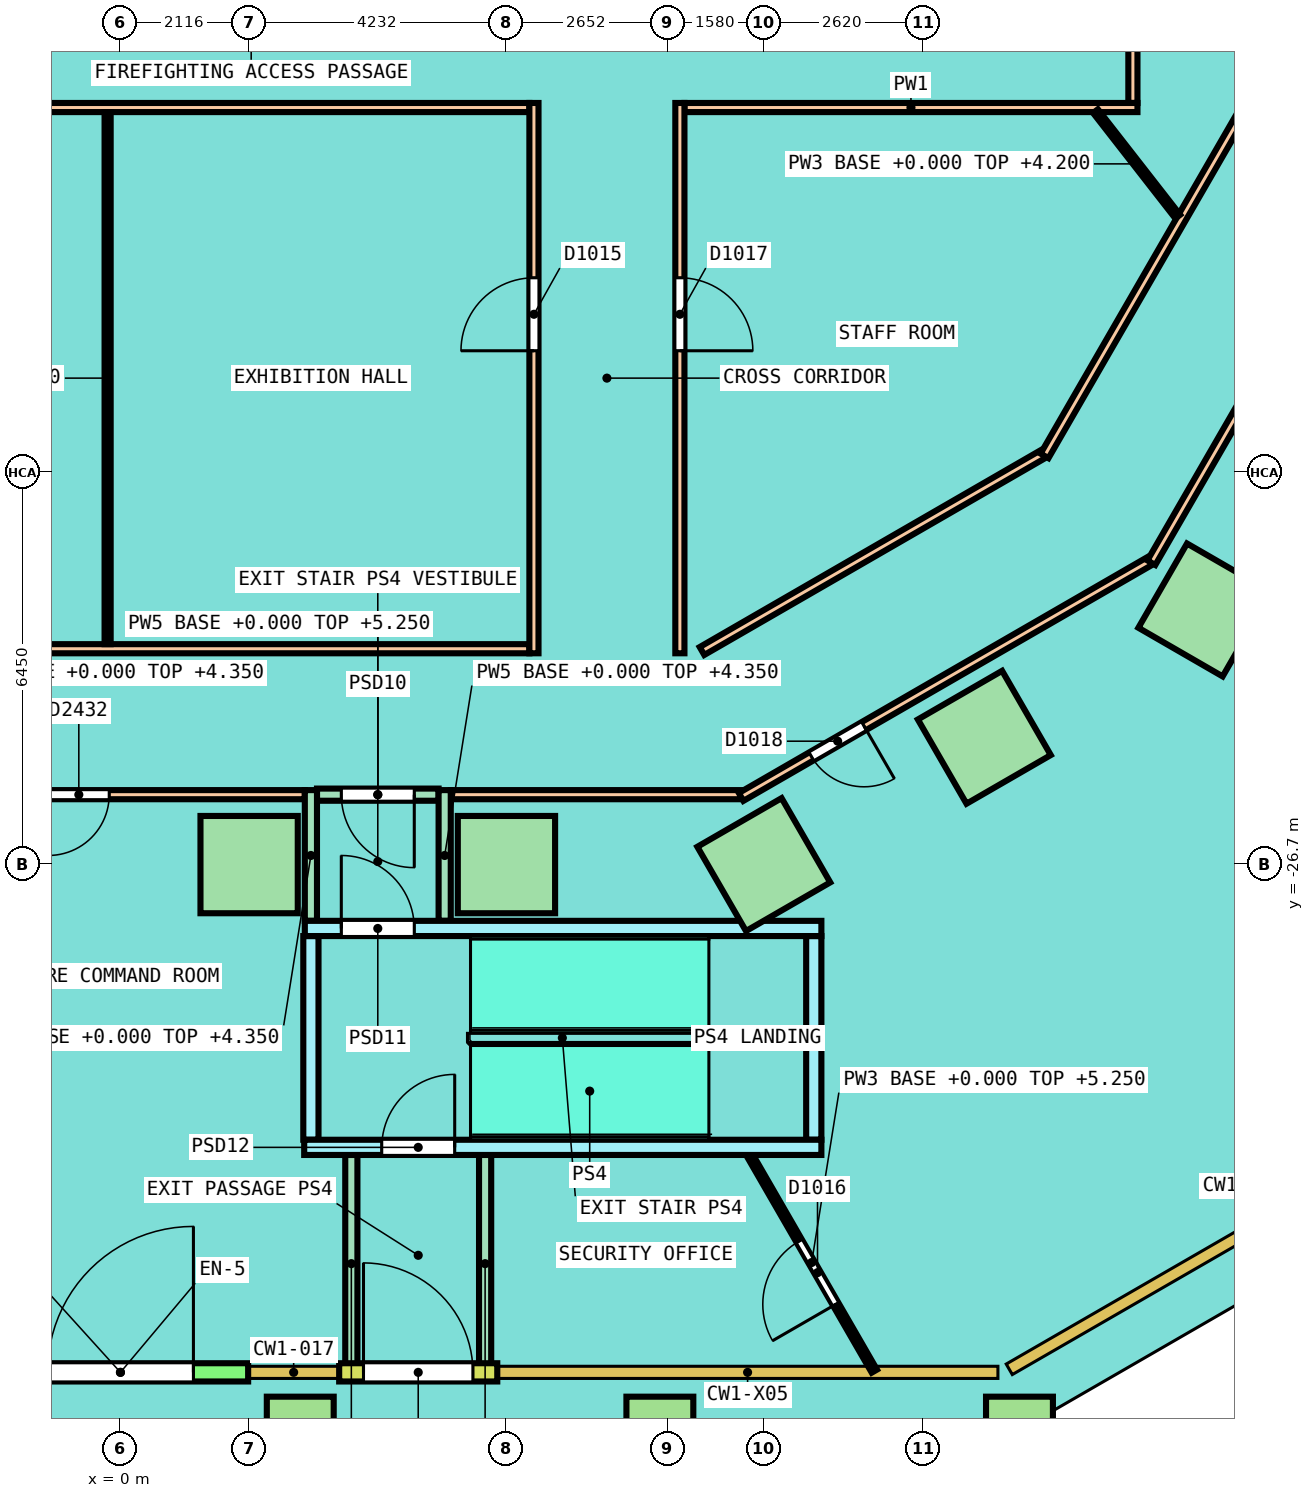
"""IFC4 building model, lengths in metres.
Left out: names, types, materials, properties, quantities, classifications, styles, units other than length and angle.
Written with IfcOpenShell. Run it as: python <this file> out.ifc"""

import sys

from ifc_helpers import new_model, si_unit, direction, frame, frame_2d, origin, origin_2d, place, context, subcontext, project, spatial, rectangle, extrude, element, fill, save


model = new_model("IFC4")
c1 = context("Model", 3, precision=1e-05, world=origin(), true_north=direction((0.0, 1.0)))
c2 = subcontext(c1, "Body", "Model", "MODEL_VIEW")
j1 = project(units=[si_unit("LENGTHUNIT", "METRE"), si_unit("PLANEANGLEUNIT", "RADIAN")], contexts=[c1])
p1 = place(None, origin())
s1 = spatial("IfcSite", under=j1, at=p1, CompositionType="ELEMENT")
p2 = place(p1, origin())
s2 = spatial("IfcBuilding", under=s1, at=p2, CompositionType="ELEMENT")
p3 = place(p2, origin())
s3 = spatial("IfcBuildingStorey", under=s2, at=p3, CompositionType="ELEMENT", Elevation=0.0)
for number, where, z_axis, x_axis in (
    (1, (2.116, -26.7, 0.0), (0.0, 0.0, 1.0), (1.0, 0.0, 0.0)),
    (2, (6.348, -26.7, 0.0), (0.0, 0.0, 1.0), (1.0, 0.0, 0.0)),
    (3, (10.58, -26.7, 0.0), (0.0, 0.0, 1.0), (0.866, 0.5, 0.0)),
    (4, (14.206, -24.606, 0.0), (0.0, 0.0, 1.0), (0.866, 0.5, 0.0)),
    (5, (17.833, -22.512, 0.0), (0.0, 0.0, 1.0), (0.5, 0.866, 0.0)),
):
    element("IfcColumn", number, at=place(p3, frame(where, z_axis=z_axis, x_axis=x_axis)), inside=s3, PredefinedType="COLUMN", context=c2, shape_type="SweptSolid", body=[
        extrude(rectangle(XDim=1.6, YDim=1.6, at=origin_2d()), origin(), (0.0, 0.0, 1.0), 5.25),
    ])
for number, where, z_axis, x_axis in (
    (6, (2.957, -36.0, -0.35), (0.0, 0.0, 1.0), (1.0, 0.0, 0.0)),
    (7, (8.871, -36.0, -0.35), (0.0, 0.0, 1.0), (1.0, 0.0, 0.0)),
    (8, (14.785, -36.0, -0.35), (0.0, 0.0, 1.0), (1.0, 0.0, 0.0)),
):
    element("IfcColumn", number, at=place(p3, frame(where, z_axis=z_axis, x_axis=x_axis)), inside=s3, PredefinedType="COLUMN", context=c2, shape_type="SweptSolid", body=[
        extrude(rectangle(XDim=1.1, YDim=1.1, at=origin_2d()), origin(), (0.0, 0.0, 1.0), 5.6),
    ])
p4 = place(p3, frame((-2.1, -35.05, 0.0), z_axis=(0.0, 0.0, 1.0), x_axis=(1.0, 0.0, 0.0)))
e9 = element("IfcWall", 9, at=p4, inside=s3, PredefinedType="SOLIDWALL", context=c2, shape_type="SweptSolid", body=[
    extrude(rectangle(XDim=4.2, YDim=0.3, at=frame_2d((2.1, 0.0))), origin(), (0.0, 0.0, 1.0), 5.25),
])
p5 = place(p4, frame((0.9, 0.0, 0.0)))
e10 = element("IfcOpeningElement", 10, at=p5, cuts=e9, PredefinedType="OPENING", context=c2, shape_type="SweptSolid", body=[
    extrude(rectangle(XDim=2.4, YDim=3.0, at=frame_2d((1.2, 1.5))), frame((0.0, 0.16, 0.0), z_axis=(0.0, -1.0, 0.0), x_axis=(1.0, 0.0, 0.0)), (0.0, 0.0, 1.0), 0.32),
])
p6 = place(p3, frame((3.597, -35.05, 0.0), z_axis=(0.0, 0.0, 1.0), x_axis=(1.0, 0.0, 0.0)))
e11 = element("IfcWall", 11, at=p6, inside=s3, PredefinedType="SOLIDWALL", context=c2, shape_type="SweptSolid", body=[
    extrude(rectangle(XDim=2.6, YDim=0.3, at=frame_2d((1.3, 0.0))), origin(), (0.0, 0.0, 1.0), 5.25),
])
p7 = place(p6, frame((2.2, 0.0, 0.0), z_axis=(0.0, 0.0, 1.0), x_axis=(-1.0, 0.0, 0.0)))
e12 = element("IfcOpeningElement", 12, at=p7, cuts=e11, PredefinedType="OPENING", context=c2, shape_type="SweptSolid", body=[
    extrude(rectangle(XDim=1.8, YDim=2.4, at=frame_2d((0.9, 1.2))), frame((0.0, 0.16, 0.0), z_axis=(0.0, -1.0, 0.0), x_axis=(1.0, 0.0, 0.0)), (0.0, 0.0, 1.0), 0.32),
])
p8 = place(p3, frame((16.65, -14.175, 0.0), z_axis=(0.0, 0.0, 1.0), x_axis=(0.0, 1.0, 0.0)))
e13 = element("IfcWall", 13, at=p8, inside=s3, PredefinedType="PARTITIONING", context=c2, shape_type="SweptSolid", body=[
    extrude(rectangle(XDim=19.275, YDim=0.15, at=frame_2d((9.638, 0.0))), origin(), (0.0, 0.0, 1.0), 4.2),
])
p9 = place(p3, frame((-9.704, -23.15, 0.0), z_axis=(0.0, 0.0, 1.0), x_axis=(1.0, 0.0, 0.0)))
e14 = element("IfcWall", 14, at=p9, inside=s3, PredefinedType="PARTITIONING", context=c2, shape_type="SweptSolid", body=[
    extrude(rectangle(XDim=16.429, YDim=0.15, at=frame_2d((8.214, 0.0))), origin(), (0.0, 0.0, 1.0), 4.2),
])
p10 = place(p3, frame((-3.032, -25.55, 0.0), z_axis=(0.0, 0.0, 1.0), x_axis=(1.0, 0.0, 0.0)))
e15 = element("IfcWall", 15, at=p10, inside=s3, PredefinedType="PARTITIONING", context=c2, shape_type="SweptSolid", body=[
    extrude(rectangle(XDim=6.064, YDim=0.15, at=frame_2d((3.032, 0.0))), origin(), (0.0, 0.0, 1.0), 4.2),
])
p11 = place(p10, frame((1.847, 0.0, 0.0)))
e16 = element("IfcOpeningElement", 16, at=p11, cuts=e15, PredefinedType="OPENING", context=c2, shape_type="SweptSolid", body=[
    extrude(rectangle(XDim=1.0, YDim=2.1, at=frame_2d((0.5, 1.05))), frame((0.0, 0.085, 0.0), z_axis=(0.0, -1.0, 0.0), x_axis=(1.0, 0.0, 0.0)), (0.0, 0.0, 1.0), 0.17),
])
p12 = place(p3, frame((5.432, -25.55, 0.0), z_axis=(0.0, 0.0, 1.0), x_axis=(1.0, 0.0, 0.0)))
e17 = element("IfcWall", 17, at=p12, inside=s3, PredefinedType="PARTITIONING", context=c2, shape_type="SweptSolid", body=[
    extrude(rectangle(XDim=4.765, YDim=0.15, at=frame_2d((2.382, 0.0))), origin(), (0.0, 0.0, 1.0), 4.2),
])
p13 = place(p3, frame((9.564, -23.188, 0.0), z_axis=(0.0, 0.0, 1.0), x_axis=(0.866024786089, 0.500001069878, 0.0)))
e18 = element("IfcWall", 18, at=p13, inside=s3, PredefinedType="PARTITIONING", context=c2, shape_type="SweptSolid", body=[
    extrude(rectangle(XDim=6.473, YDim=0.15, at=frame_2d((3.236, 0.0))), origin(), (0.0, 0.0, 1.0), 4.2),
])
p14 = place(p3, frame((15.197, -19.979, 0.0), z_axis=(0.0, 0.0, 1.0), x_axis=(0.499992422807, 0.866029778435, 0.0)))
e19 = element("IfcWall", 19, at=p14, inside=s3, PredefinedType="PARTITIONING", context=c2, shape_type="SweptSolid", body=[
    extrude(rectangle(XDim=19.257, YDim=0.15, at=frame_2d((9.628, 0.0))), origin(), (0.0, 0.0, 1.0), 4.2),
])
p15 = place(p14, frame((9.43, 0.0, 0.0)))
e20 = element("IfcOpeningElement", 20, at=p15, cuts=e19, PredefinedType="OPENING", context=c2, shape_type="SweptSolid", body=[
    extrude(rectangle(XDim=1.0, YDim=2.1, at=frame_2d((0.5, 1.05))), frame((0.0, 0.085, 0.0), z_axis=(0.0, -1.0, 0.0), x_axis=(1.0, 0.0, 0.0)), (0.0, 0.0, 1.0), 0.17),
])
p16 = place(p3, frame((10.207, -25.587, 0.0), z_axis=(0.0, 0.0, 1.0), x_axis=(0.866023143435, 0.50000391502, 0.0)))
e21 = element("IfcWall", 21, at=p16, inside=s3, PredefinedType="PARTITIONING", context=c2, shape_type="SweptSolid", body=[
    extrude(rectangle(XDim=7.759, YDim=0.15, at=frame_2d((3.879, 0.0))), origin(), (0.0, 0.0, 1.0), 4.2),
])
p17 = place(p16, frame((1.334, 0.0, 0.0)))
e22 = element("IfcOpeningElement", 22, at=p17, cuts=e21, PredefinedType="OPENING", context=c2, shape_type="SweptSolid", body=[
    extrude(rectangle(XDim=1.0, YDim=2.1, at=frame_2d((0.5, 1.05))), frame((0.0, 0.085, 0.0), z_axis=(0.0, -1.0, 0.0), x_axis=(1.0, 0.0, 0.0)), (0.0, 0.0, 1.0), 0.17),
])
p18 = place(p3, frame((16.954, -21.736, 0.0), z_axis=(0.0, 0.0, 1.0), x_axis=(0.499996491498, 0.86602742941, 0.0)))
e23 = element("IfcWall", 23, at=p18, inside=s3, PredefinedType="PARTITIONING", context=c2, shape_type="SweptSolid", body=[
    extrude(rectangle(XDim=20.694, YDim=0.15, at=frame_2d((10.347, 0.0))), origin(), (0.0, 0.0, 1.0), 4.2),
])
p19 = place(p18, frame((13.254, 0.0, 0.0)))
e24 = element("IfcOpeningElement", 24, at=p19, cuts=e23, PredefinedType="OPENING", context=c2, shape_type="SweptSolid", body=[
    extrude(rectangle(XDim=1.0, YDim=2.1, at=frame_2d((0.5, 1.05))), frame((0.0, 0.085, 0.0), z_axis=(0.0, -1.0, 0.0), x_axis=(1.0, 0.0, 0.0)), (0.0, 0.0, 1.0), 0.17),
])
p20 = place(p3, frame((-16.725, -14.25, 0.0), z_axis=(0.0, 0.0, 1.0), x_axis=(1.0, 0.0, 0.0)))
e25 = element("IfcWall", 25, at=p20, inside=s3, PredefinedType="PARTITIONING", context=c2, shape_type="SweptSolid", body=[
    extrude(rectangle(XDim=23.45, YDim=0.15, at=frame_2d((11.725, 0.0))), origin(), (0.0, 0.0, 1.0), 4.2),
])
p21 = place(p3, frame((9.275, -14.25, 0.0), z_axis=(0.0, 0.0, 1.0), x_axis=(1.0, 0.0, 0.0)))
e26 = element("IfcWall", 26, at=p21, inside=s3, PredefinedType="PARTITIONING", context=c2, shape_type="SweptSolid", body=[
    extrude(rectangle(XDim=7.45, YDim=0.15, at=frame_2d((3.725, 0.0))), origin(), (0.0, 0.0, 1.0), 4.2),
])
p22 = place(p3, frame((6.8, -23.225, 0.0), z_axis=(0.0, 0.0, 1.0), x_axis=(0.0, 1.0, 0.0)))
e27 = element("IfcWall", 27, at=p22, inside=s3, PredefinedType="PARTITIONING", context=c2, shape_type="SweptSolid", body=[
    extrude(rectangle(XDim=9.05, YDim=0.15, at=frame_2d((4.525, 0.0))), origin(), (0.0, 0.0, 1.0), 4.2),
])
p23 = place(p22, frame((4.975, 0.0, 0.0)))
e28 = element("IfcOpeningElement", 28, at=p23, cuts=e27, PredefinedType="OPENING", context=c2, shape_type="SweptSolid", body=[
    extrude(rectangle(XDim=1.2, YDim=2.1, at=frame_2d((0.6, 1.05))), frame((0.0, 0.085, 0.0), z_axis=(0.0, -1.0, 0.0), x_axis=(1.0, 0.0, 0.0)), (0.0, 0.0, 1.0), 0.17),
])
p24 = place(p3, frame((9.2, -23.225, 0.0), z_axis=(0.0, 0.0, 1.0), x_axis=(0.0, 1.0, 0.0)))
e29 = element("IfcWall", 29, at=p24, inside=s3, PredefinedType="PARTITIONING", context=c2, shape_type="SweptSolid", body=[
    extrude(rectangle(XDim=9.05, YDim=0.15, at=frame_2d((4.525, 0.0))), origin(), (0.0, 0.0, 1.0), 4.2),
])
p25 = place(p24, frame((4.975, 0.0, 0.0)))
e30 = element("IfcOpeningElement", 30, at=p25, cuts=e29, PredefinedType="OPENING", context=c2, shape_type="SweptSolid", body=[
    extrude(rectangle(XDim=1.2, YDim=2.1, at=frame_2d((0.6, 1.05))), frame((0.0, 0.085, 0.0), z_axis=(0.0, -1.0, 0.0), x_axis=(1.0, 0.0, 0.0)), (0.0, 0.0, 1.0), 0.17),
])
p26 = place(p3, frame((3.232, -25.55, 0.0), z_axis=(0.0, 0.0, 1.0), x_axis=(1.0, 0.0, 0.0)))
e31 = element("IfcWall", 31, at=p26, inside=s3, PredefinedType="PARTITIONING", context=c2, shape_type="SweptSolid", body=[
    extrude(rectangle(XDim=2.0, YDim=0.2, at=frame_2d((1.0, 0.0))), origin(), (0.0, 0.0, 1.0), 5.25),
])
p27 = place(p26, frame((1.6, 0.0, 0.0), z_axis=(0.0, 0.0, 1.0), x_axis=(-1.0, 0.0, 0.0)))
e32 = element("IfcOpeningElement", 32, at=p27, cuts=e31, PredefinedType="OPENING", context=c2, shape_type="SweptSolid", body=[
    extrude(rectangle(XDim=1.2, YDim=2.1, at=frame_2d((0.6, 1.05))), frame((0.0, 0.11, 0.0), z_axis=(0.0, -1.0, 0.0), x_axis=(1.0, 0.0, 0.0)), (0.0, 0.0, 1.0), 0.22),
])
p28 = place(p3, frame((5.332, -27.625, 0.0), z_axis=(0.0, 0.0, 1.0), x_axis=(0.0, 1.0, 0.0)))
e33 = element("IfcWall", 33, at=p28, inside=s3, PredefinedType="PARTITIONING", context=c2, shape_type="SweptSolid", body=[
    extrude(rectangle(XDim=2.15, YDim=0.2, at=frame_2d((1.075, 0.0))), origin(), (0.0, 0.0, 1.0), 4.35),
])
p29 = place(p3, frame((5.997, -35.05, 0.0), z_axis=(0.0, 0.0, 1.0), x_axis=(0.0, 1.0, 0.0)))
e34 = element("IfcWall", 34, at=p29, inside=s3, PredefinedType="PARTITIONING", context=c2, shape_type="SweptSolid", body=[
    extrude(rectangle(XDim=3.575, YDim=0.2, at=frame_2d((1.788, 0.0))), origin(), (0.0, 0.0, 1.0), 5.25),
])
p30 = place(p3, frame((3.132, -27.625, 0.0), z_axis=(0.0, 0.0, 1.0), x_axis=(0.0, 1.0, 0.0)))
e35 = element("IfcWall", 35, at=p30, inside=s3, PredefinedType="PARTITIONING", context=c2, shape_type="SweptSolid", body=[
    extrude(rectangle(XDim=2.15, YDim=0.2, at=frame_2d((1.075, 0.0))), origin(), (0.0, 0.0, 1.0), 4.35),
])
p31 = place(p3, frame((3.797, -35.05, 0.0), z_axis=(0.0, 0.0, 1.0), x_axis=(0.0, 1.0, 0.0)))
e36 = element("IfcWall", 36, at=p31, inside=s3, PredefinedType="PARTITIONING", context=c2, shape_type="SweptSolid", body=[
    extrude(rectangle(XDim=3.575, YDim=0.2, at=frame_2d((1.788, 0.0))), origin(), (0.0, 0.0, 1.0), 5.25),
])
p32 = place(p3, frame((-0.211, -23.075, 0.0), z_axis=(0.0, 0.0, 1.0), x_axis=(0.0, 1.0, 0.0)))
e37 = element("IfcWall", 37, at=p32, inside=s3, PredefinedType="PARTITIONING", context=c2, shape_type="SweptSolid", body=[
    extrude(rectangle(XDim=8.75, YDim=0.1, at=frame_2d((4.375, 0.0))), origin(), (0.0, 0.0, 1.0), 5.25),
])
p33 = place(p3, frame((10.336, -31.458, 0.0), z_axis=(0.0, 0.0, 1.0), x_axis=(0.50004186299, -0.866001232827, 0.0)))
e38 = element("IfcWall", 38, at=p33, inside=s3, PredefinedType="PARTITIONING", context=c2, shape_type="SweptSolid", body=[
    extrude(rectangle(XDim=4.124, YDim=0.1, at=frame_2d((2.062, 0.0))), origin(), (0.0, 0.0, 1.0), 5.25),
])
p34 = place(p33, frame((1.655, 0.0, 0.0)))
e39 = element("IfcOpeningElement", 39, at=p34, cuts=e38, PredefinedType="OPENING", context=c2, shape_type="SweptSolid", body=[
    extrude(rectangle(XDim=1.2, YDim=2.1, at=frame_2d((0.6, 1.05))), frame((0.0, 0.06, 0.0), z_axis=(0.0, -1.0, 0.0), x_axis=(1.0, 0.0, 0.0)), (0.0, 0.0, 1.0), 0.12),
])
p35 = place(p3, frame((16.035, -14.309, 0.0), z_axis=(0.0, 0.0, 1.0), x_axis=(0.614862065397, -0.788634668611, 0.0)))
e40 = element("IfcWall", 40, at=p35, inside=s3, PredefinedType="PARTITIONING", context=c2, shape_type="SweptSolid", body=[
    extrude(rectangle(XDim=2.2, YDim=0.1, at=frame_2d((1.1, 0.0))), origin(), (0.0, 0.0, 1.0), 4.2),
])
for number, where, z_axis, x_axis in (
    (41, (3.132, -31.225, 0.0), (0.0, 0.0, 1.0), (0.0, 1.0, 0.0)),
    (42, (11.402, -31.225, 0.0), (0.0, 0.0, 1.0), (0.0, 1.0, 0.0)),
):
    element("IfcWall", number, at=place(p3, frame(where, z_axis=z_axis, x_axis=x_axis)), inside=s3, PredefinedType="SOLIDWALL", context=c2, shape_type="SweptSolid", body=[
        extrude(rectangle(XDim=3.35, YDim=0.25, at=frame_2d((1.675, 0.0))), origin(), (0.0, 0.0, 1.0), 5.25),
    ])
p36 = place(p3, frame((3.032, -27.75, 0.0), z_axis=(0.0, 0.0, 1.0), x_axis=(1.0, 0.0, 0.0)))
e43 = element("IfcWall", 43, at=p36, inside=s3, PredefinedType="SOLIDWALL", context=c2, shape_type="SweptSolid", body=[
    extrude(rectangle(XDim=8.495, YDim=0.25, at=frame_2d((4.248, 0.0))), origin(), (0.0, 0.0, 1.0), 5.25),
])
p37 = place(p36, frame((1.8, 0.0, 0.0), z_axis=(0.0, 0.0, 1.0), x_axis=(-1.0, 0.0, 0.0)))
e44 = element("IfcOpeningElement", 44, at=p37, cuts=e43, PredefinedType="OPENING", context=c2, shape_type="SweptSolid", body=[
    extrude(rectangle(XDim=1.2, YDim=2.1, at=frame_2d((0.6, 1.05))), frame((0.0, 0.135, 0.0), z_axis=(0.0, -1.0, 0.0), x_axis=(1.0, 0.0, 0.0)), (0.0, 0.0, 1.0), 0.27),
])
p38 = place(p3, frame((3.022, -31.35, 0.0), z_axis=(0.0, 0.0, 1.0), x_axis=(1.0, 0.0, 0.0)))
e45 = element("IfcWall", 45, at=p38, inside=s3, PredefinedType="SOLIDWALL", context=c2, shape_type="SweptSolid", body=[
    extrude(rectangle(XDim=8.505, YDim=0.25, at=frame_2d((4.252, 0.0))), origin(), (0.0, 0.0, 1.0), 5.25),
])
p39 = place(p38, frame((2.475, 0.0, 0.0), z_axis=(0.0, 0.0, 1.0), x_axis=(-1.0, 0.0, 0.0)))
e46 = element("IfcOpeningElement", 46, at=p39, cuts=e45, PredefinedType="OPENING", context=c2, shape_type="SweptSolid", body=[
    extrude(rectangle(XDim=1.2, YDim=2.1, at=frame_2d((0.6, 1.05))), frame((0.0, 0.135, 0.0), z_axis=(0.0, -1.0, 0.0), x_axis=(1.0, 0.0, 0.0)), (0.0, 0.0, 1.0), 0.27),
])
p40 = place(p5, origin())
e47 = element("IfcDoor", 47, at=p40, inside=s3, OperationType="DOUBLE_DOOR_SINGLE_SWING", PredefinedType="DOOR", context=c2, shape_type="SweptSolid", body=[
    extrude(rectangle(XDim=2.4, YDim=3.0, at=frame_2d((1.2, 1.5))), frame((0.0, 0.025, 0.0), z_axis=(0.0, -1.0, 0.0), x_axis=(1.0, 0.0, 0.0)), (0.0, 0.0, 1.0), 0.05),
])
fill(e10, e47)
p41 = place(p7, origin())
e48 = element("IfcDoor", 48, at=p41, inside=s3, OperationType="DOUBLE_DOOR_SINGLE_SWING", PredefinedType="DOOR", context=c2, shape_type="SweptSolid", body=[
    extrude(rectangle(XDim=1.8, YDim=2.4, at=frame_2d((0.9, 1.2))), frame((0.0, 0.025, 0.0), z_axis=(0.0, -1.0, 0.0), x_axis=(1.0, 0.0, 0.0)), (0.0, 0.0, 1.0), 0.05),
])
fill(e12, e48)
p42 = place(p23, origin())
e49 = element("IfcDoor", 49, at=p42, inside=s3, OperationType="DOUBLE_DOOR_SINGLE_SWING", PredefinedType="DOOR", context=c2, shape_type="SweptSolid", body=[
    extrude(rectangle(XDim=1.2, YDim=2.1, at=frame_2d((0.6, 1.05))), frame((0.0, 0.025, 0.0), z_axis=(0.0, -1.0, 0.0), x_axis=(1.0, 0.0, 0.0)), (0.0, 0.0, 1.0), 0.05),
])
fill(e28, e49)
p43 = place(p34, origin())
e50 = element("IfcDoor", 50, at=p43, inside=s3, OperationType="DOUBLE_DOOR_SINGLE_SWING", PredefinedType="DOOR", context=c2, shape_type="SweptSolid", body=[
    extrude(rectangle(XDim=1.2, YDim=2.1, at=frame_2d((0.6, 1.05))), frame((0.0, 0.025, 0.0), z_axis=(0.0, -1.0, 0.0), x_axis=(1.0, 0.0, 0.0)), (0.0, 0.0, 1.0), 0.05),
])
fill(e39, e50)
p44 = place(p25, origin())
e51 = element("IfcDoor", 51, at=p44, inside=s3, OperationType="DOUBLE_DOOR_SINGLE_SWING", PredefinedType="DOOR", context=c2, shape_type="SweptSolid", body=[
    extrude(rectangle(XDim=1.2, YDim=2.1, at=frame_2d((0.6, 1.05))), frame((0.0, 0.025, 0.0), z_axis=(0.0, -1.0, 0.0), x_axis=(1.0, 0.0, 0.0)), (0.0, 0.0, 1.0), 0.05),
])
fill(e30, e51)
p45 = place(p17, origin())
e52 = element("IfcDoor", 52, at=p45, inside=s3, OperationType="SINGLE_SWING_RIGHT", PredefinedType="DOOR", context=c2, shape_type="SweptSolid", body=[
    extrude(rectangle(XDim=1.0, YDim=2.1, at=frame_2d((0.5, 1.05))), frame((0.0, 0.025, 0.0), z_axis=(0.0, -1.0, 0.0), x_axis=(1.0, 0.0, 0.0)), (0.0, 0.0, 1.0), 0.05),
])
fill(e22, e52)
p46 = place(p27, origin())
e53 = element("IfcDoor", 53, at=p46, inside=s3, OperationType="SINGLE_SWING_LEFT", PredefinedType="DOOR", context=c2, shape_type="SweptSolid", body=[
    extrude(rectangle(XDim=1.2, YDim=2.1, at=frame_2d((0.6, 1.05))), frame((0.0, 0.025, 0.0), z_axis=(0.0, -1.0, 0.0), x_axis=(1.0, 0.0, 0.0)), (0.0, 0.0, 1.0), 0.05),
])
fill(e32, e53)
p47 = place(p37, origin())
e54 = element("IfcDoor", 54, at=p47, inside=s3, OperationType="SINGLE_SWING_RIGHT", PredefinedType="DOOR", context=c2, shape_type="SweptSolid", body=[
    extrude(rectangle(XDim=1.2, YDim=2.1, at=frame_2d((0.6, 1.05))), frame((0.0, 0.025, 0.0), z_axis=(0.0, -1.0, 0.0), x_axis=(1.0, 0.0, 0.0)), (0.0, 0.0, 1.0), 0.05),
])
fill(e44, e54)
p48 = place(p39, origin())
e55 = element("IfcDoor", 55, at=p48, inside=s3, OperationType="SINGLE_SWING_LEFT", PredefinedType="DOOR", context=c2, shape_type="SweptSolid", body=[
    extrude(rectangle(XDim=1.2, YDim=2.1, at=frame_2d((0.6, 1.05))), frame((0.0, 0.025, 0.0), z_axis=(0.0, -1.0, 0.0), x_axis=(1.0, 0.0, 0.0)), (0.0, 0.0, 1.0), 0.05),
])
fill(e46, e55)
p49 = place(p11, origin())
e56 = element("IfcDoor", 56, at=p49, inside=s3, OperationType="SINGLE_SWING_RIGHT", PredefinedType="DOOR", context=c2, shape_type="SweptSolid", body=[
    extrude(rectangle(XDim=1.0, YDim=2.1, at=frame_2d((0.5, 1.05))), frame((0.0, 0.025, 0.0), z_axis=(0.0, -1.0, 0.0), x_axis=(1.0, 0.0, 0.0)), (0.0, 0.0, 1.0), 0.05),
])
fill(e16, e56)
save(model, sys.argv[1])
